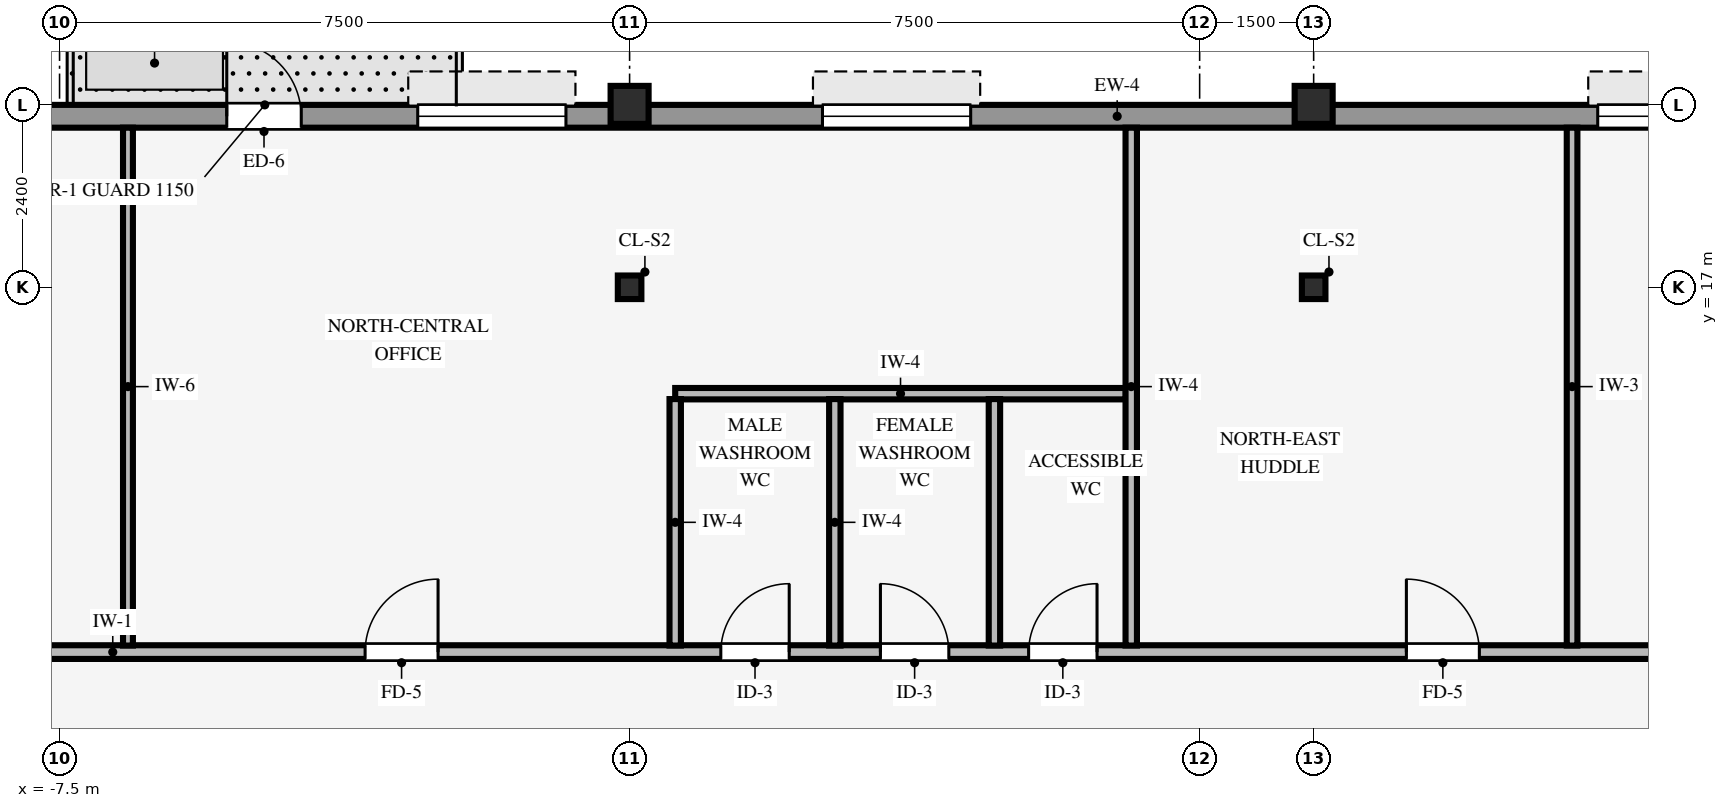
"""IFC4 building model, lengths in metres.
Left out: names, types, materials, properties, quantities, classifications, styles, units other than length and angle.
Written with IfcOpenShell. Run it as: python <this file> out.ifc"""

import sys

from ifc_helpers import new_model, si_unit, direction, frame, frame_2d, origin, origin_2d, place, context, subcontext, project, spatial, rectangle, hollow_rectangle, i_section, extrude, source, transform, mapped, element, fill, save


model = new_model("IFC4")
c1 = context("Model", 3, precision=1e-05, world=origin(), true_north=direction((0.0, 1.0)))
c2 = subcontext(c1, "Body", "Model", "MODEL_VIEW")
j1 = project(units=[si_unit("LENGTHUNIT", "METRE"), si_unit("PLANEANGLEUNIT", "RADIAN")], contexts=[c1])
p1 = place(None, origin())
s1 = spatial("IfcSite", under=j1, at=p1, CompositionType="ELEMENT")
p2 = place(p1, origin())
s2 = spatial("IfcBuilding", under=s1, at=p2, CompositionType="ELEMENT")
p3 = place(p2, frame((0.0, 0.0, 231.05)))
s3 = spatial("IfcBuildingStorey", under=s2, at=p3, CompositionType="ELEMENT", Elevation=231.05)
for number, where, z_axis, x_axis in (
    (1, (0.0, 19.4, 0.0), (0.0, 0.0, 1.0), (1.0, 0.0, 0.0)),
    (2, (9.0, 19.4, 0.0), (0.0, 0.0, 1.0), (1.0, 0.0, 0.0)),
):
    element("IfcColumn", number, at=place(p3, frame(where, z_axis=z_axis, x_axis=x_axis)), inside=s3, PredefinedType="COLUMN", context=c2, shape_type="SweptSolid", body=[
        extrude(hollow_rectangle(XDim=0.5, YDim=0.5, WallThickness=0.032, InnerFilletRadius=0.032, OuterFilletRadius=0.064, at=origin_2d()), origin(), (0.0, 0.0, 1.0), 3.37),
    ])
for number, where, z_axis, x_axis in (
    (3, (0.0, 17.0, 0.0), (0.0, 0.0, 1.0), (1.0, 0.0, 0.0)),
    (4, (9.0, 17.0, 0.0), (0.0, 0.0, 1.0), (1.0, 0.0, 0.0)),
):
    element("IfcColumn", number, at=place(p3, frame(where, z_axis=z_axis, x_axis=x_axis)), inside=s3, PredefinedType="COLUMN", context=c2, shape_type="SweptSolid", body=[
        extrude(i_section(OverallWidth=0.31, OverallDepth=0.31, WebThickness=0.015, FlangeThickness=0.015, FilletRadius=0.015, at=origin_2d()), origin(), (0.0, 0.0, 1.0), 3.37),
    ])
p4 = place(p3, frame((-24.3, 19.25, 0.0), z_axis=(0.0, 0.0, 1.0), x_axis=(1.0, 0.0, 0.0)))
e5 = element("IfcWall", 5, at=p4, inside=s3, PredefinedType="STANDARD", context=c2, shape_type="SweptSolid", body=[
    extrude(rectangle(XDim=41.0, YDim=0.3, at=frame_2d((20.5, 0.0))), origin(), (0.0, 0.0, 1.0), 2.705),
])
p5 = place(p4, frame((19.0, 0.0, 0.0)))
e6 = element("IfcOpeningElement", 6, at=p5, cuts=e5, PredefinedType="OPENING", context=c2, shape_type="SweptSolid", body=[
    extrude(rectangle(XDim=0.98, YDim=2.15, at=frame_2d((0.49, 1.075))), frame((0.0, 0.16, 0.0), z_axis=(0.0, -1.0, 0.0), x_axis=(1.0, 0.0, 0.0)), (0.0, 0.0, 1.0), 0.32),
])
p6 = place(p4, frame((2.462, 0.0, 0.8)))
e7 = element("IfcOpeningElement", 7, at=p6, cuts=e5, PredefinedType="OPENING", context=c2, shape_type="SweptSolid", body=[
    extrude(rectangle(XDim=1.95, YDim=1.48, at=frame_2d((0.975, 0.74))), frame((0.0, 0.16, 0.0), z_axis=(0.0, -1.0, 0.0), x_axis=(1.0, 0.0, 0.0)), (0.0, 0.0, 1.0), 0.32),
])
p7 = place(p4, frame((7.337, 0.0, 0.8)))
e8 = element("IfcOpeningElement", 8, at=p7, cuts=e5, PredefinedType="OPENING", context=c2, shape_type="SweptSolid", body=[
    extrude(rectangle(XDim=1.95, YDim=1.48, at=frame_2d((0.975, 0.74))), frame((0.0, 0.16, 0.0), z_axis=(0.0, -1.0, 0.0), x_axis=(1.0, 0.0, 0.0)), (0.0, 0.0, 1.0), 0.32),
])
p8 = place(p4, frame((21.512, 0.0, 0.8)))
e9 = element("IfcOpeningElement", 9, at=p8, cuts=e5, PredefinedType="OPENING", context=c2, shape_type="SweptSolid", body=[
    extrude(rectangle(XDim=1.95, YDim=1.48, at=frame_2d((0.975, 0.74))), frame((0.0, 0.16, 0.0), z_axis=(0.0, -1.0, 0.0), x_axis=(1.0, 0.0, 0.0)), (0.0, 0.0, 1.0), 0.32),
])
p9 = place(p4, frame((26.837, 0.0, 0.8)))
e10 = element("IfcOpeningElement", 10, at=p9, cuts=e5, PredefinedType="OPENING", context=c2, shape_type="SweptSolid", body=[
    extrude(rectangle(XDim=1.95, YDim=1.48, at=frame_2d((0.975, 0.74))), frame((0.0, 0.16, 0.0), z_axis=(0.0, -1.0, 0.0), x_axis=(1.0, 0.0, 0.0)), (0.0, 0.0, 1.0), 0.32),
])
p10 = place(p4, frame((37.038, 0.0, 0.8)))
e11 = element("IfcOpeningElement", 11, at=p10, cuts=e5, PredefinedType="OPENING", context=c2, shape_type="SweptSolid", body=[
    extrude(rectangle(XDim=1.95, YDim=1.48, at=frame_2d((0.975, 0.74))), frame((0.0, 0.16, 0.0), z_axis=(0.0, -1.0, 0.0), x_axis=(1.0, 0.0, 0.0)), (0.0, 0.0, 1.0), 0.32),
])
p11 = place(p3, frame((-15.0, 12.2, 0.0), z_axis=(0.0, 0.0, 1.0), x_axis=(1.0, 0.0, 0.0)))
e12 = element("IfcWall", 12, at=p11, inside=s3, PredefinedType="PARTITIONING", context=c2, shape_type="SweptSolid", body=[
    extrude(rectangle(XDim=30.8, YDim=0.18, at=frame_2d((15.4, 0.0))), origin(), (0.0, 0.0, 1.0), 3.36),
])
p12 = place(p11, frame((11.52, 0.0, 0.0)))
e13 = element("IfcOpeningElement", 13, at=p12, cuts=e12, PredefinedType="OPENING", context=c2, shape_type="SweptSolid", body=[
    extrude(rectangle(XDim=0.96, YDim=2.1, at=frame_2d((0.48, 1.05))), frame((0.0, 0.1, 0.0), z_axis=(0.0, -1.0, 0.0), x_axis=(1.0, 0.0, 0.0)), (0.0, 0.0, 1.0), 0.2),
])
p13 = place(p11, frame((25.22, 0.0, 0.0)))
e14 = element("IfcOpeningElement", 14, at=p13, cuts=e12, PredefinedType="OPENING", context=c2, shape_type="SweptSolid", body=[
    extrude(rectangle(XDim=0.96, YDim=2.1, at=frame_2d((0.48, 1.05))), frame((0.0, 0.1, 0.0), z_axis=(0.0, -1.0, 0.0), x_axis=(1.0, 0.0, 0.0)), (0.0, 0.0, 1.0), 0.2),
])
p14 = place(p11, frame((28.62, 0.0, 0.0)))
e15 = element("IfcOpeningElement", 15, at=p14, cuts=e12, PredefinedType="OPENING", context=c2, shape_type="SweptSolid", body=[
    extrude(rectangle(XDim=0.96, YDim=2.1, at=frame_2d((0.48, 1.05))), frame((0.0, 0.1, 0.0), z_axis=(0.0, -1.0, 0.0), x_axis=(1.0, 0.0, 0.0)), (0.0, 0.0, 1.0), 0.2),
])
p15 = place(p11, frame((3.92, 0.0, 0.0)))
e16 = element("IfcOpeningElement", 16, at=p15, cuts=e12, PredefinedType="OPENING", context=c2, shape_type="SweptSolid", body=[
    extrude(rectangle(XDim=0.96, YDim=2.1, at=frame_2d((0.48, 1.05))), frame((0.0, 0.1, 0.0), z_axis=(0.0, -1.0, 0.0), x_axis=(1.0, 0.0, 0.0)), (0.0, 0.0, 1.0), 0.2),
])
p16 = place(p11, frame((16.2, 0.0, 0.0)))
e17 = element("IfcOpeningElement", 17, at=p16, cuts=e12, PredefinedType="OPENING", context=c2, shape_type="SweptSolid", body=[
    extrude(rectangle(XDim=0.9, YDim=2.1, at=frame_2d((0.45, 1.05))), frame((0.0, 0.1, 0.0), z_axis=(0.0, -1.0, 0.0), x_axis=(1.0, 0.0, 0.0)), (0.0, 0.0, 1.0), 0.2),
])
p17 = place(p11, frame((18.3, 0.0, 0.0)))
e18 = element("IfcOpeningElement", 18, at=p17, cuts=e12, PredefinedType="OPENING", context=c2, shape_type="SweptSolid", body=[
    extrude(rectangle(XDim=0.9, YDim=2.1, at=frame_2d((0.45, 1.05))), frame((0.0, 0.1, 0.0), z_axis=(0.0, -1.0, 0.0), x_axis=(1.0, 0.0, 0.0)), (0.0, 0.0, 1.0), 0.2),
])
p18 = place(p11, frame((20.25, 0.0, 0.0)))
e19 = element("IfcOpeningElement", 19, at=p18, cuts=e12, PredefinedType="OPENING", context=c2, shape_type="SweptSolid", body=[
    extrude(rectangle(XDim=0.9, YDim=2.1, at=frame_2d((0.45, 1.05))), frame((0.0, 0.1, 0.0), z_axis=(0.0, -1.0, 0.0), x_axis=(1.0, 0.0, 0.0)), (0.0, 0.0, 1.0), 0.2),
])
p19 = place(p3, frame((0.6, 15.6, 0.0), z_axis=(0.0, 0.0, 1.0), x_axis=(1.0, 0.0, 0.0)))
e20 = element("IfcWall", 20, at=p19, inside=s3, PredefinedType="PARTITIONING", context=c2, shape_type="SweptSolid", body=[
    extrude(rectangle(XDim=5.929, YDim=0.15, at=frame_2d((2.964, 0.0))), origin(), (0.0, 0.0, 1.0), 3.36),
])
p20 = place(p3, frame((-6.6, 12.286, 0.0), z_axis=(0.0, 0.0, 1.0), x_axis=(0.0, 1.0, 0.0)))
e21 = element("IfcWall", 21, at=p20, inside=s3, PredefinedType="PARTITIONING", context=c2, shape_type="SweptSolid", body=[
    extrude(rectangle(XDim=6.814, YDim=0.13, at=frame_2d((3.407, 0.0))), origin(), (0.0, 0.0, 1.0), 3.36),
])
for number, where, z_axis, x_axis in (
    (22, (0.6, 12.286, 0.0), (0.0, 0.0, 1.0), (0.0, 1.0, 0.0)),
    (23, (2.7, 12.286, 0.0), (0.0, 0.0, 1.0), (0.0, 1.0, 0.0)),
    (24, (4.8, 12.286, 0.0), (0.0, 0.0, 1.0), (0.0, 1.0, 0.0)),
):
    element("IfcWall", number, at=place(p3, frame(where, z_axis=z_axis, x_axis=x_axis)), inside=s3, PredefinedType="PARTITIONING", context=c2, shape_type="SweptSolid", body=[
        extrude(rectangle(XDim=3.243, YDim=0.15, at=frame_2d((1.622, 0.0))), origin(), (0.0, 0.0, 1.0), 3.36),
    ])
p21 = place(p3, frame((6.6, 12.286, 0.0), z_axis=(0.0, 0.0, 1.0), x_axis=(0.0, 1.0, 0.0)))
e25 = element("IfcWall", 25, at=p21, inside=s3, PredefinedType="PARTITIONING", context=c2, shape_type="SweptSolid", body=[
    extrude(rectangle(XDim=6.814, YDim=0.15, at=frame_2d((3.407, 0.0))), origin(), (0.0, 0.0, 1.0), 3.36),
])
p22 = place(p3, frame((12.4, 12.286, 0.0), z_axis=(0.0, 0.0, 1.0), x_axis=(0.0, 1.0, 0.0)))
e26 = element("IfcWall", 26, at=p22, inside=s3, PredefinedType="PARTITIONING", context=c2, shape_type="SweptSolid", body=[
    extrude(rectangle(XDim=6.814, YDim=0.14, at=frame_2d((3.407, 0.0))), origin(), (0.0, 0.0, 1.0), 3.36),
])
m1 = source(origin(), c2, "Body", "SweptSolid", [
    extrude(rectangle(XDim=0.98, YDim=2.15, at=frame_2d((0.49, 1.075))), frame((0.0, 0.025, 0.0), z_axis=(0.0, -1.0, 0.0), x_axis=(1.0, 0.0, 0.0)), (0.0, 0.0, 1.0), 0.05),
])
p23 = place(p5, origin())
e27 = element("IfcDoor", 27, at=p23, inside=s3, OperationType="SINGLE_SWING_LEFT", PredefinedType="DOOR", context=c2, shape_type="MappedRepresentation", body=[
    mapped(m1, transform((0.0, 0.0, 0.0), scale=1.0)),
])
fill(e6, e27)
m2 = source(origin(), c2, "Body", "SweptSolid", [
    extrude(rectangle(XDim=1.95, YDim=1.48, at=frame_2d((0.975, 0.74))), frame((0.0, 0.03, 0.0), z_axis=(0.0, -1.0, 0.0), x_axis=(1.0, 0.0, 0.0)), (0.0, 0.0, 1.0), 0.06),
])
p24 = place(p8, origin())
e28 = element("IfcWindow", 28, at=p24, inside=s3, PartitioningType="SINGLE_PANEL", PredefinedType="WINDOW", context=c2, shape_type="MappedRepresentation", body=[
    mapped(m2, transform((0.0, 0.0, 0.0), scale=1.0)),
])
fill(e9, e28)
p25 = place(p9, origin())
e29 = element("IfcWindow", 29, at=p25, inside=s3, PartitioningType="SINGLE_PANEL", PredefinedType="WINDOW", context=c2, shape_type="MappedRepresentation", body=[
    mapped(m2, transform((0.0, 0.0, 0.0), scale=1.0)),
])
fill(e10, e29)
p26 = place(p10, origin())
e30 = element("IfcWindow", 30, at=p26, inside=s3, PartitioningType="SINGLE_PANEL", PredefinedType="WINDOW", context=c2, shape_type="MappedRepresentation", body=[
    mapped(m2, transform((0.0, 0.0, 0.0), scale=1.0)),
])
fill(e11, e30)
m3 = source(origin(), c2, "Body", "SweptSolid", [
    extrude(rectangle(XDim=0.96, YDim=2.1, at=frame_2d((0.48, 1.05))), frame((0.0, 0.025, 0.0), z_axis=(0.0, -1.0, 0.0), x_axis=(1.0, 0.0, 0.0)), (0.0, 0.0, 1.0), 0.05),
])
p27 = place(p12, origin())
e31 = element("IfcDoor", 31, at=p27, inside=s3, OperationType="SINGLE_SWING_RIGHT", PredefinedType="DOOR", context=c2, shape_type="MappedRepresentation", body=[
    mapped(m3, transform((0.0, 0.0, 0.0), scale=1.0)),
])
fill(e13, e31)
p28 = place(p13, origin())
e32 = element("IfcDoor", 32, at=p28, inside=s3, OperationType="SINGLE_SWING_LEFT", PredefinedType="DOOR", context=c2, shape_type="MappedRepresentation", body=[
    mapped(m3, transform((0.0, 0.0, 0.0), scale=1.0)),
])
fill(e14, e32)
m4 = source(origin(), c2, "Body", "SweptSolid", [
    extrude(rectangle(XDim=0.9, YDim=2.1, at=frame_2d((0.45, 1.05))), frame((0.0, 0.025, 0.0), z_axis=(0.0, -1.0, 0.0), x_axis=(1.0, 0.0, 0.0)), (0.0, 0.0, 1.0), 0.05),
])
p29 = place(p16, origin())
e33 = element("IfcDoor", 33, at=p29, inside=s3, OperationType="SINGLE_SWING_RIGHT", PredefinedType="DOOR", context=c2, shape_type="MappedRepresentation", body=[
    mapped(m4, transform((0.0, 0.0, 0.0), scale=1.0)),
])
fill(e17, e33)
p30 = place(p17, origin())
e34 = element("IfcDoor", 34, at=p30, inside=s3, OperationType="SINGLE_SWING_LEFT", PredefinedType="DOOR", context=c2, shape_type="MappedRepresentation", body=[
    mapped(m4, transform((0.0, 0.0, 0.0), scale=1.0)),
])
fill(e18, e34)
p31 = place(p18, origin())
e35 = element("IfcDoor", 35, at=p31, inside=s3, OperationType="SINGLE_SWING_RIGHT", PredefinedType="DOOR", context=c2, shape_type="MappedRepresentation", body=[
    mapped(m4, transform((0.0, 0.0, 0.0), scale=1.0)),
])
fill(e19, e35)
save(model, sys.argv[1])
